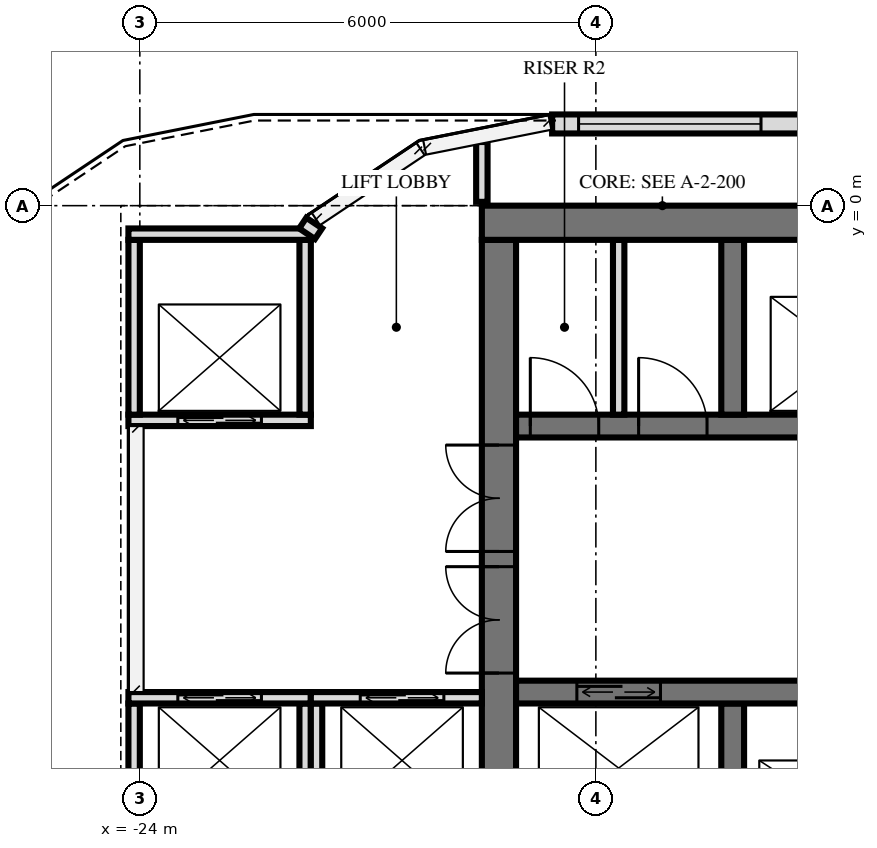
"""IFC4 building model, lengths in metres.
Left out: names, types, materials, properties, quantities, classifications, styles, units other than length and angle.
Written with IfcOpenShell. Run it as: python <this file> out.ifc"""

import sys

from ifc_helpers import new_model, si_unit, direction, frame, frame_2d, origin, place, context, subcontext, project, spatial, rectangle, extrude, element, fill, save


model = new_model("IFC4")
c1 = context("Model", 3, precision=1e-05, world=origin(), true_north=direction((0.0, 1.0)))
c2 = subcontext(c1, "Body", "Model", "MODEL_VIEW")
j1 = project(units=[si_unit("LENGTHUNIT", "METRE"), si_unit("PLANEANGLEUNIT", "RADIAN")], contexts=[c1])
p1 = place(None, origin())
s1 = spatial("IfcSite", under=j1, at=p1, CompositionType="ELEMENT")
p2 = place(p1, origin())
s2 = spatial("IfcBuilding", under=s1, at=p2, CompositionType="ELEMENT")
p3 = place(p2, frame((0.0, 0.0, 246.6)))
s3 = spatial("IfcBuildingStorey", under=s2, at=p3, CompositionType="ELEMENT", Elevation=246.6)
p4 = place(p3, frame((-19.5, -0.225, 0.0), z_axis=(0.0, 0.0, 1.0), x_axis=(1.0, 0.0, 0.0)))
e1 = element("IfcWall", 1, at=p4, inside=s3, PredefinedType="SHEAR", context=c2, shape_type="SweptSolid", body=[
    extrude(rectangle(XDim=9.5, YDim=0.45, at=frame_2d((4.75, 0.0))), origin(), (0.0, 0.0, 1.0), 6.0),
])
p5 = place(p3, frame((-19.275, -14.55, 0.0), z_axis=(0.0, 0.0, 1.0), x_axis=(0.0, 1.0, 0.0)))
e2 = element("IfcWall", 2, at=p5, inside=s3, PredefinedType="SHEAR", context=c2, shape_type="SweptSolid", body=[
    extrude(rectangle(XDim=14.1, YDim=0.45, at=frame_2d((7.05, 0.0))), origin(), (0.0, 0.0, 1.0), 6.0),
])
p6 = place(p5, frame((8.4, 0.0, 0.0)))
e3 = element("IfcOpeningElement", 3, at=p6, cuts=e2, PredefinedType="OPENING", context=c2, shape_type="SweptSolid", body=[
    extrude(rectangle(XDim=1.4, YDim=2.4, at=frame_2d((0.7, 1.2))), frame((0.0, 0.235, 0.0), z_axis=(0.0, -1.0, 0.0), x_axis=(1.0, 0.0, 0.0)), (0.0, 0.0, 1.0), 0.47),
])
p7 = place(p5, frame((10.0, 0.0, 0.0)))
e4 = element("IfcOpeningElement", 4, at=p7, cuts=e2, PredefinedType="OPENING", context=c2, shape_type="SweptSolid", body=[
    extrude(rectangle(XDim=1.4, YDim=2.4, at=frame_2d((0.7, 1.2))), frame((0.0, 0.235, 0.0), z_axis=(0.0, -1.0, 0.0), x_axis=(1.0, 0.0, 0.0)), (0.0, 0.0, 1.0), 0.47),
])
p8 = place(p3, frame((-19.05, -2.9, 0.0), z_axis=(0.0, 0.0, 1.0), x_axis=(1.0, 0.0, 0.0)))
e5 = element("IfcWall", 5, at=p8, inside=s3, PredefinedType="SHEAR", context=c2, shape_type="SweptSolid", body=[
    extrude(rectangle(XDim=8.7, YDim=0.3, at=frame_2d((4.35, 0.0))), origin(), (0.0, 0.0, 1.0), 6.0),
])
p9 = place(p8, frame((6.8, 0.0, 0.0)))
e6 = element("IfcOpeningElement", 6, at=p9, cuts=e5, PredefinedType="OPENING", context=c2, shape_type="SweptSolid", body=[
    extrude(rectangle(XDim=1.1, YDim=2.1, at=frame_2d((0.55, 1.05))), frame((0.0, 0.16, 0.0), z_axis=(0.0, -1.0, 0.0), x_axis=(1.0, 0.0, 0.0)), (0.0, 0.0, 1.0), 0.32),
])
p10 = place(p8, frame((3.8, 0.0, 0.0)))
e7 = element("IfcOpeningElement", 7, at=p10, cuts=e5, PredefinedType="OPENING", context=c2, shape_type="SweptSolid", body=[
    extrude(rectangle(XDim=1.1, YDim=2.1, at=frame_2d((0.55, 1.05))), frame((0.0, 0.16, 0.0), z_axis=(0.0, -1.0, 0.0), x_axis=(1.0, 0.0, 0.0)), (0.0, 0.0, 1.0), 0.32),
])
p11 = place(p8, frame((1.613, 0.0, 0.0)))
e8 = element("IfcOpeningElement", 8, at=p11, cuts=e5, PredefinedType="OPENING", context=c2, shape_type="SweptSolid", body=[
    extrude(rectangle(XDim=0.9, YDim=2.1, at=frame_2d((0.45, 1.05))), frame((0.0, 0.16, 0.0), z_axis=(0.0, -1.0, 0.0), x_axis=(1.0, 0.0, 0.0)), (0.0, 0.0, 1.0), 0.32),
])
p12 = place(p8, frame((0.188, 0.0, 0.0)))
e9 = element("IfcOpeningElement", 9, at=p12, cuts=e5, PredefinedType="OPENING", context=c2, shape_type="SweptSolid", body=[
    extrude(rectangle(XDim=0.9, YDim=2.1, at=frame_2d((0.45, 1.05))), frame((0.0, 0.16, 0.0), z_axis=(0.0, -1.0, 0.0), x_axis=(1.0, 0.0, 0.0)), (0.0, 0.0, 1.0), 0.32),
])
p13 = place(p3, frame((-19.05, -6.4, 0.0), z_axis=(0.0, 0.0, 1.0), x_axis=(1.0, 0.0, 0.0)))
e10 = element("IfcWall", 10, at=p13, inside=s3, PredefinedType="SHEAR", context=c2, shape_type="SweptSolid", body=[
    extrude(rectangle(XDim=8.7, YDim=0.3, at=frame_2d((4.35, 0.0))), origin(), (0.0, 0.0, 1.0), 6.0),
])
p14 = place(p13, frame((0.8, 0.0, 0.0)))
e11 = element("IfcOpeningElement", 11, at=p14, cuts=e10, PredefinedType="OPENING", context=c2, shape_type="SweptSolid", body=[
    extrude(rectangle(XDim=1.1, YDim=2.1, at=frame_2d((0.55, 1.05))), frame((0.0, 0.16, 0.0), z_axis=(0.0, -1.0, 0.0), x_axis=(1.0, 0.0, 0.0)), (0.0, 0.0, 1.0), 0.32),
])
for number, where, z_axis, x_axis in (
    (12, (-16.2, -2.75, 0.0), (0.0, 0.0, 1.0), (0.0, 1.0, 0.0)),
    (13, (-16.2, -8.85, 0.0), (0.0, 0.0, 1.0), (0.0, 1.0, 0.0)),
):
    element("IfcWall", number, at=place(p3, frame(where, z_axis=z_axis, x_axis=x_axis)), inside=s3, PredefinedType="SHEAR", context=c2, shape_type="SweptSolid", body=[
        extrude(rectangle(XDim=2.3, YDim=0.3, at=frame_2d((1.15, 0.0))), origin(), (0.0, 0.0, 1.0), 6.0),
    ])
p15 = place(p3, frame((-21.706, -0.229, 0.0), z_axis=(0.0, 0.0, 1.0), x_axis=(-0.555699055242, -0.831383521609, 0.0)))
e14 = element("IfcWall", 14, at=p15, inside=s3, PredefinedType="SOLIDWALL", context=c2, shape_type="SweptSolid", body=[
    extrude(rectangle(XDim=0.169, YDim=0.25, at=frame_2d((0.084, 0.0))), origin(), (0.0, 0.0, 1.0), 5.72),
])
p16 = place(p3, frame((18.575, 1.075, 0.0), z_axis=(0.0, 0.0, 1.0), x_axis=(-1.0, 0.0, 0.0)))
e15 = element("IfcWall", 15, at=p16, inside=s3, PredefinedType="SOLIDWALL", context=c2, shape_type="SweptSolid", body=[
    extrude(rectangle(XDim=37.151, YDim=0.25, at=frame_2d((18.575, 0.0))), origin(), (0.0, 0.0, 1.0), 5.72),
])
p17 = place(p16, frame((0.348, 0.0, 0.858)))
e16 = element("IfcOpeningElement", 16, at=p17, cuts=e15, PredefinedType="OPENING", context=c2, shape_type="SweptSolid", body=[
    extrude(rectangle(XDim=2.4, YDim=3.6, at=frame_2d((1.2, 1.8))), frame((0.0, 0.135, 0.0), z_axis=(0.0, -1.0, 0.0), x_axis=(1.0, 0.0, 0.0)), (0.0, 0.0, 1.0), 0.27),
])
p18 = place(p16, frame((3.444, 0.0, 0.858)))
e17 = element("IfcOpeningElement", 17, at=p18, cuts=e15, PredefinedType="OPENING", context=c2, shape_type="SweptSolid", body=[
    extrude(rectangle(XDim=2.4, YDim=3.6, at=frame_2d((1.2, 1.8))), frame((0.0, 0.135, 0.0), z_axis=(0.0, -1.0, 0.0), x_axis=(1.0, 0.0, 0.0)), (0.0, 0.0, 1.0), 0.27),
])
p19 = place(p16, frame((6.54, 0.0, 0.858)))
e18 = element("IfcOpeningElement", 18, at=p19, cuts=e15, PredefinedType="OPENING", context=c2, shape_type="SweptSolid", body=[
    extrude(rectangle(XDim=2.4, YDim=3.6, at=frame_2d((1.2, 1.8))), frame((0.0, 0.135, 0.0), z_axis=(0.0, -1.0, 0.0), x_axis=(1.0, 0.0, 0.0)), (0.0, 0.0, 1.0), 0.27),
])
p20 = place(p16, frame((9.635, 0.0, 0.858)))
e19 = element("IfcOpeningElement", 19, at=p20, cuts=e15, PredefinedType="OPENING", context=c2, shape_type="SweptSolid", body=[
    extrude(rectangle(XDim=2.4, YDim=3.6, at=frame_2d((1.2, 1.8))), frame((0.0, 0.135, 0.0), z_axis=(0.0, -1.0, 0.0), x_axis=(1.0, 0.0, 0.0)), (0.0, 0.0, 1.0), 0.27),
])
p21 = place(p16, frame((12.731, 0.0, 0.858)))
e20 = element("IfcOpeningElement", 20, at=p21, cuts=e15, PredefinedType="OPENING", context=c2, shape_type="SweptSolid", body=[
    extrude(rectangle(XDim=2.4, YDim=3.6, at=frame_2d((1.2, 1.8))), frame((0.0, 0.135, 0.0), z_axis=(0.0, -1.0, 0.0), x_axis=(1.0, 0.0, 0.0)), (0.0, 0.0, 1.0), 0.27),
])
p22 = place(p16, frame((15.827, 0.0, 0.858)))
e21 = element("IfcOpeningElement", 21, at=p22, cuts=e15, PredefinedType="OPENING", context=c2, shape_type="SweptSolid", body=[
    extrude(rectangle(XDim=2.4, YDim=3.6, at=frame_2d((1.2, 1.8))), frame((0.0, 0.135, 0.0), z_axis=(0.0, -1.0, 0.0), x_axis=(1.0, 0.0, 0.0)), (0.0, 0.0, 1.0), 0.27),
])
p23 = place(p16, frame((18.923, 0.0, 0.858)))
e22 = element("IfcOpeningElement", 22, at=p23, cuts=e15, PredefinedType="OPENING", context=c2, shape_type="SweptSolid", body=[
    extrude(rectangle(XDim=2.4, YDim=3.6, at=frame_2d((1.2, 1.8))), frame((0.0, 0.135, 0.0), z_axis=(0.0, -1.0, 0.0), x_axis=(1.0, 0.0, 0.0)), (0.0, 0.0, 1.0), 0.27),
])
p24 = place(p16, frame((22.019, 0.0, 0.858)))
e23 = element("IfcOpeningElement", 23, at=p24, cuts=e15, PredefinedType="OPENING", context=c2, shape_type="SweptSolid", body=[
    extrude(rectangle(XDim=2.4, YDim=3.6, at=frame_2d((1.2, 1.8))), frame((0.0, 0.135, 0.0), z_axis=(0.0, -1.0, 0.0), x_axis=(1.0, 0.0, 0.0)), (0.0, 0.0, 1.0), 0.27),
])
p25 = place(p16, frame((25.115, 0.0, 0.858)))
e24 = element("IfcOpeningElement", 24, at=p25, cuts=e15, PredefinedType="OPENING", context=c2, shape_type="SweptSolid", body=[
    extrude(rectangle(XDim=2.4, YDim=3.6, at=frame_2d((1.2, 1.8))), frame((0.0, 0.135, 0.0), z_axis=(0.0, -1.0, 0.0), x_axis=(1.0, 0.0, 0.0)), (0.0, 0.0, 1.0), 0.27),
])
p26 = place(p16, frame((28.211, 0.0, 0.858)))
e25 = element("IfcOpeningElement", 25, at=p26, cuts=e15, PredefinedType="OPENING", context=c2, shape_type="SweptSolid", body=[
    extrude(rectangle(XDim=2.4, YDim=3.6, at=frame_2d((1.2, 1.8))), frame((0.0, 0.135, 0.0), z_axis=(0.0, -1.0, 0.0), x_axis=(1.0, 0.0, 0.0)), (0.0, 0.0, 1.0), 0.27),
])
p27 = place(p16, frame((31.307, 0.0, 0.858)))
e26 = element("IfcOpeningElement", 26, at=p27, cuts=e15, PredefinedType="OPENING", context=c2, shape_type="SweptSolid", body=[
    extrude(rectangle(XDim=2.4, YDim=3.6, at=frame_2d((1.2, 1.8))), frame((0.0, 0.135, 0.0), z_axis=(0.0, -1.0, 0.0), x_axis=(1.0, 0.0, 0.0)), (0.0, 0.0, 1.0), 0.27),
])
p28 = place(p16, frame((34.403, 0.0, 0.858)))
e27 = element("IfcOpeningElement", 27, at=p28, cuts=e15, PredefinedType="OPENING", context=c2, shape_type="SweptSolid", body=[
    extrude(rectangle(XDim=2.4, YDim=3.6, at=frame_2d((1.2, 1.8))), frame((0.0, 0.135, 0.0), z_axis=(0.0, -1.0, 0.0), x_axis=(1.0, 0.0, 0.0)), (0.0, 0.0, 1.0), 0.27),
])
p29 = place(p3, frame((-21.75, -6.475, 0.0), z_axis=(0.0, 0.0, 1.0), x_axis=(1.0, 0.0, 0.0)))
e28 = element("IfcWall", 28, at=p29, inside=s3, PredefinedType="PARTITIONING", context=c2, shape_type="SweptSolid", body=[
    extrude(rectangle(XDim=2.25, YDim=0.15, at=frame_2d((1.125, 0.0))), origin(), (0.0, 0.0, 1.0), 5.2),
])
p30 = place(p29, frame((0.65, 0.0, 0.0)))
e29 = element("IfcOpeningElement", 29, at=p30, cuts=e28, PredefinedType="OPENING", context=c2, shape_type="SweptSolid", body=[
    extrude(rectangle(XDim=1.1, YDim=2.1, at=frame_2d((0.55, 1.05))), frame((0.0, 0.085, 0.0), z_axis=(0.0, -1.0, 0.0), x_axis=(1.0, 0.0, 0.0)), (0.0, 0.0, 1.0), 0.17),
])
p31 = place(p3, frame((-21.675, -8.85, 0.0), z_axis=(0.0, 0.0, 1.0), x_axis=(0.0, 1.0, 0.0)))
e30 = element("IfcWall", 30, at=p31, inside=s3, PredefinedType="PARTITIONING", context=c2, shape_type="SweptSolid", body=[
    extrude(rectangle(XDim=2.3, YDim=0.15, at=frame_2d((1.15, 0.0))), origin(), (0.0, 0.0, 1.0), 5.2),
])
p32 = place(p3, frame((-24.15, -2.825, 0.0), z_axis=(0.0, 0.0, 1.0), x_axis=(1.0, 0.0, 0.0)))
e31 = element("IfcWall", 31, at=p32, inside=s3, PredefinedType="PARTITIONING", context=c2, shape_type="SweptSolid", body=[
    extrude(rectangle(XDim=2.4, YDim=0.15, at=frame_2d((1.2, 0.0))), origin(), (0.0, 0.0, 1.0), 4.6),
])
p33 = place(p32, frame((0.65, 0.0, 0.0)))
e32 = element("IfcOpeningElement", 32, at=p33, cuts=e31, PredefinedType="OPENING", context=c2, shape_type="SweptSolid", body=[
    extrude(rectangle(XDim=1.1, YDim=2.1, at=frame_2d((0.55, 1.05))), frame((0.0, 0.085, 0.0), z_axis=(0.0, -1.0, 0.0), x_axis=(1.0, 0.0, 0.0)), (0.0, 0.0, 1.0), 0.17),
])
p34 = place(p3, frame((-24.15, -0.375, 0.0), z_axis=(0.0, 0.0, 1.0), x_axis=(1.0, 0.0, 0.0)))
e33 = element("IfcWall", 33, at=p34, inside=s3, PredefinedType="PARTITIONING", context=c2, shape_type="SweptSolid", body=[
    extrude(rectangle(XDim=2.4, YDim=0.15, at=frame_2d((1.2, 0.0))), origin(), (0.0, 0.0, 1.0), 5.72),
])
p35 = place(p3, frame((-24.075, -2.75, 0.0), z_axis=(0.0, 0.0, 1.0), x_axis=(0.0, 1.0, 0.0)))
e34 = element("IfcWall", 34, at=p35, inside=s3, PredefinedType="PARTITIONING", context=c2, shape_type="SweptSolid", body=[
    extrude(rectangle(XDim=2.3, YDim=0.15, at=frame_2d((1.15, 0.0))), origin(), (0.0, 0.0, 1.0), 5.72),
])
p36 = place(p3, frame((-21.825, -2.75, 0.0), z_axis=(0.0, 0.0, 1.0), x_axis=(0.0, 1.0, 0.0)))
e35 = element("IfcWall", 35, at=p36, inside=s3, PredefinedType="PARTITIONING", context=c2, shape_type="SweptSolid", body=[
    extrude(rectangle(XDim=2.3, YDim=0.15, at=frame_2d((1.15, 0.0))), origin(), (0.0, 0.0, 1.0), 4.6),
])
p37 = place(p3, frame((-24.15, -6.475, 0.0), z_axis=(0.0, 0.0, 1.0), x_axis=(1.0, 0.0, 0.0)))
e36 = element("IfcWall", 36, at=p37, inside=s3, PredefinedType="PARTITIONING", context=c2, shape_type="SweptSolid", body=[
    extrude(rectangle(XDim=2.4, YDim=0.15, at=frame_2d((1.2, 0.0))), origin(), (0.0, 0.0, 1.0), 4.6),
])
p38 = place(p37, frame((0.65, 0.0, 0.0)))
e37 = element("IfcOpeningElement", 37, at=p38, cuts=e36, PredefinedType="OPENING", context=c2, shape_type="SweptSolid", body=[
    extrude(rectangle(XDim=1.1, YDim=2.1, at=frame_2d((0.55, 1.05))), frame((0.0, 0.085, 0.0), z_axis=(0.0, -1.0, 0.0), x_axis=(1.0, 0.0, 0.0)), (0.0, 0.0, 1.0), 0.17),
])
p39 = place(p3, frame((-24.075, -8.85, 0.0), z_axis=(0.0, 0.0, 1.0), x_axis=(0.0, 1.0, 0.0)))
e38 = element("IfcWall", 38, at=p39, inside=s3, PredefinedType="PARTITIONING", context=c2, shape_type="SweptSolid", body=[
    extrude(rectangle(XDim=2.3, YDim=0.15, at=frame_2d((1.15, 0.0))), origin(), (0.0, 0.0, 1.0), 5.72),
])
p40 = place(p3, frame((-21.825, -8.85, 0.0), z_axis=(0.0, 0.0, 1.0), x_axis=(0.0, 1.0, 0.0)))
e39 = element("IfcWall", 39, at=p40, inside=s3, PredefinedType="PARTITIONING", context=c2, shape_type="SweptSolid", body=[
    extrude(rectangle(XDim=2.3, YDim=0.15, at=frame_2d((1.15, 0.0))), origin(), (0.0, 0.0, 1.0), 4.6),
])
p41 = place(p3, frame((-17.7, -2.75, 0.0), z_axis=(0.0, 0.0, 1.0), x_axis=(0.0, 1.0, 0.0)))
e40 = element("IfcWall", 40, at=p41, inside=s3, PredefinedType="PARTITIONING", context=c2, shape_type="SweptSolid", body=[
    extrude(rectangle(XDim=2.3, YDim=0.15, at=frame_2d((1.15, 0.0))), origin(), (0.0, 0.0, 1.0), 5.7),
])
p42 = place(p3, frame((-19.5, 0.05, 0.0), z_axis=(0.0, 0.0, 1.0), x_axis=(0.0, 1.0, 0.0)))
e41 = element("IfcWall", 41, at=p42, inside=s3, PredefinedType="PARTITIONING", context=c2, shape_type="SweptSolid", body=[
    extrude(rectangle(XDim=0.787, YDim=0.15, at=frame_2d((0.394, 0.0))), origin(), (0.0, 0.0, 1.0), 5.7),
])
p43 = place(p28, origin())
e42 = element("IfcWindow", 42, at=p43, inside=s3, PartitioningType="SINGLE_PANEL", PredefinedType="USERDEFINED", context=c2, shape_type="SweptSolid", body=[
    extrude(rectangle(XDim=2.4, YDim=3.6, at=frame_2d((1.2, 1.8))), frame((0.0, 0.03, 0.0), z_axis=(0.0, -1.0, 0.0), x_axis=(1.0, 0.0, 0.0)), (0.0, 0.0, 1.0), 0.06),
])
fill(e27, e42)
p44 = place(p30, origin())
e43 = element("IfcDoor", 43, at=p44, inside=s3, OperationType="DOUBLE_DOOR_SLIDING", PredefinedType="USERDEFINED", context=c2, shape_type="SweptSolid", body=[
    extrude(rectangle(XDim=1.1, YDim=2.1, at=frame_2d((0.55, 1.05))), frame((0.0, 0.025, 0.0), z_axis=(0.0, -1.0, 0.0), x_axis=(1.0, 0.0, 0.0)), (0.0, 0.0, 1.0), 0.05),
])
fill(e29, e43)
p45 = place(p33, origin())
e44 = element("IfcDoor", 44, at=p45, inside=s3, OperationType="DOUBLE_DOOR_SLIDING", PredefinedType="USERDEFINED", context=c2, shape_type="SweptSolid", body=[
    extrude(rectangle(XDim=1.1, YDim=2.1, at=frame_2d((0.55, 1.05))), frame((0.0, 0.025, 0.0), z_axis=(0.0, -1.0, 0.0), x_axis=(1.0, 0.0, 0.0)), (0.0, 0.0, 1.0), 0.05),
])
fill(e32, e44)
p46 = place(p38, origin())
e45 = element("IfcDoor", 45, at=p46, inside=s3, OperationType="DOUBLE_DOOR_SLIDING", PredefinedType="USERDEFINED", context=c2, shape_type="SweptSolid", body=[
    extrude(rectangle(XDim=1.1, YDim=2.1, at=frame_2d((0.55, 1.05))), frame((0.0, 0.025, 0.0), z_axis=(0.0, -1.0, 0.0), x_axis=(1.0, 0.0, 0.0)), (0.0, 0.0, 1.0), 0.05),
])
fill(e37, e45)
p47 = place(p14, origin())
e46 = element("IfcDoor", 46, at=p47, inside=s3, OperationType="DOUBLE_DOOR_SLIDING", PredefinedType="USERDEFINED", context=c2, shape_type="SweptSolid", body=[
    extrude(rectangle(XDim=1.1, YDim=2.1, at=frame_2d((0.55, 1.05))), frame((0.0, 0.025, 0.0), z_axis=(0.0, -1.0, 0.0), x_axis=(1.0, 0.0, 0.0)), (0.0, 0.0, 1.0), 0.05),
])
fill(e11, e46)
p48 = place(p6, origin())
e47 = element("IfcDoor", 47, at=p48, inside=s3, OperationType="DOUBLE_DOOR_SINGLE_SWING", PredefinedType="DOOR", context=c2, shape_type="SweptSolid", body=[
    extrude(rectangle(XDim=1.4, YDim=2.4, at=frame_2d((0.7, 1.2))), frame((0.0, 0.025, 0.0), z_axis=(0.0, -1.0, 0.0), x_axis=(1.0, 0.0, 0.0)), (0.0, 0.0, 1.0), 0.05),
])
fill(e3, e47)
p49 = place(p7, origin())
e48 = element("IfcDoor", 48, at=p49, inside=s3, OperationType="DOUBLE_DOOR_SINGLE_SWING", PredefinedType="DOOR", context=c2, shape_type="SweptSolid", body=[
    extrude(rectangle(XDim=1.4, YDim=2.4, at=frame_2d((0.7, 1.2))), frame((0.0, 0.025, 0.0), z_axis=(0.0, -1.0, 0.0), x_axis=(1.0, 0.0, 0.0)), (0.0, 0.0, 1.0), 0.05),
])
fill(e4, e48)
p50 = place(p11, origin())
e49 = element("IfcDoor", 49, at=p50, inside=s3, OperationType="SINGLE_SWING_RIGHT", PredefinedType="DOOR", context=c2, shape_type="SweptSolid", body=[
    extrude(rectangle(XDim=0.9, YDim=2.1, at=frame_2d((0.45, 1.05))), frame((0.0, 0.025, 0.0), z_axis=(0.0, -1.0, 0.0), x_axis=(1.0, 0.0, 0.0)), (0.0, 0.0, 1.0), 0.05),
])
fill(e8, e49)
p51 = place(p12, origin())
e50 = element("IfcDoor", 50, at=p51, inside=s3, OperationType="SINGLE_SWING_RIGHT", PredefinedType="DOOR", context=c2, shape_type="SweptSolid", body=[
    extrude(rectangle(XDim=0.9, YDim=2.1, at=frame_2d((0.45, 1.05))), frame((0.0, 0.025, 0.0), z_axis=(0.0, -1.0, 0.0), x_axis=(1.0, 0.0, 0.0)), (0.0, 0.0, 1.0), 0.05),
])
fill(e9, e50)
save(model, sys.argv[1])
